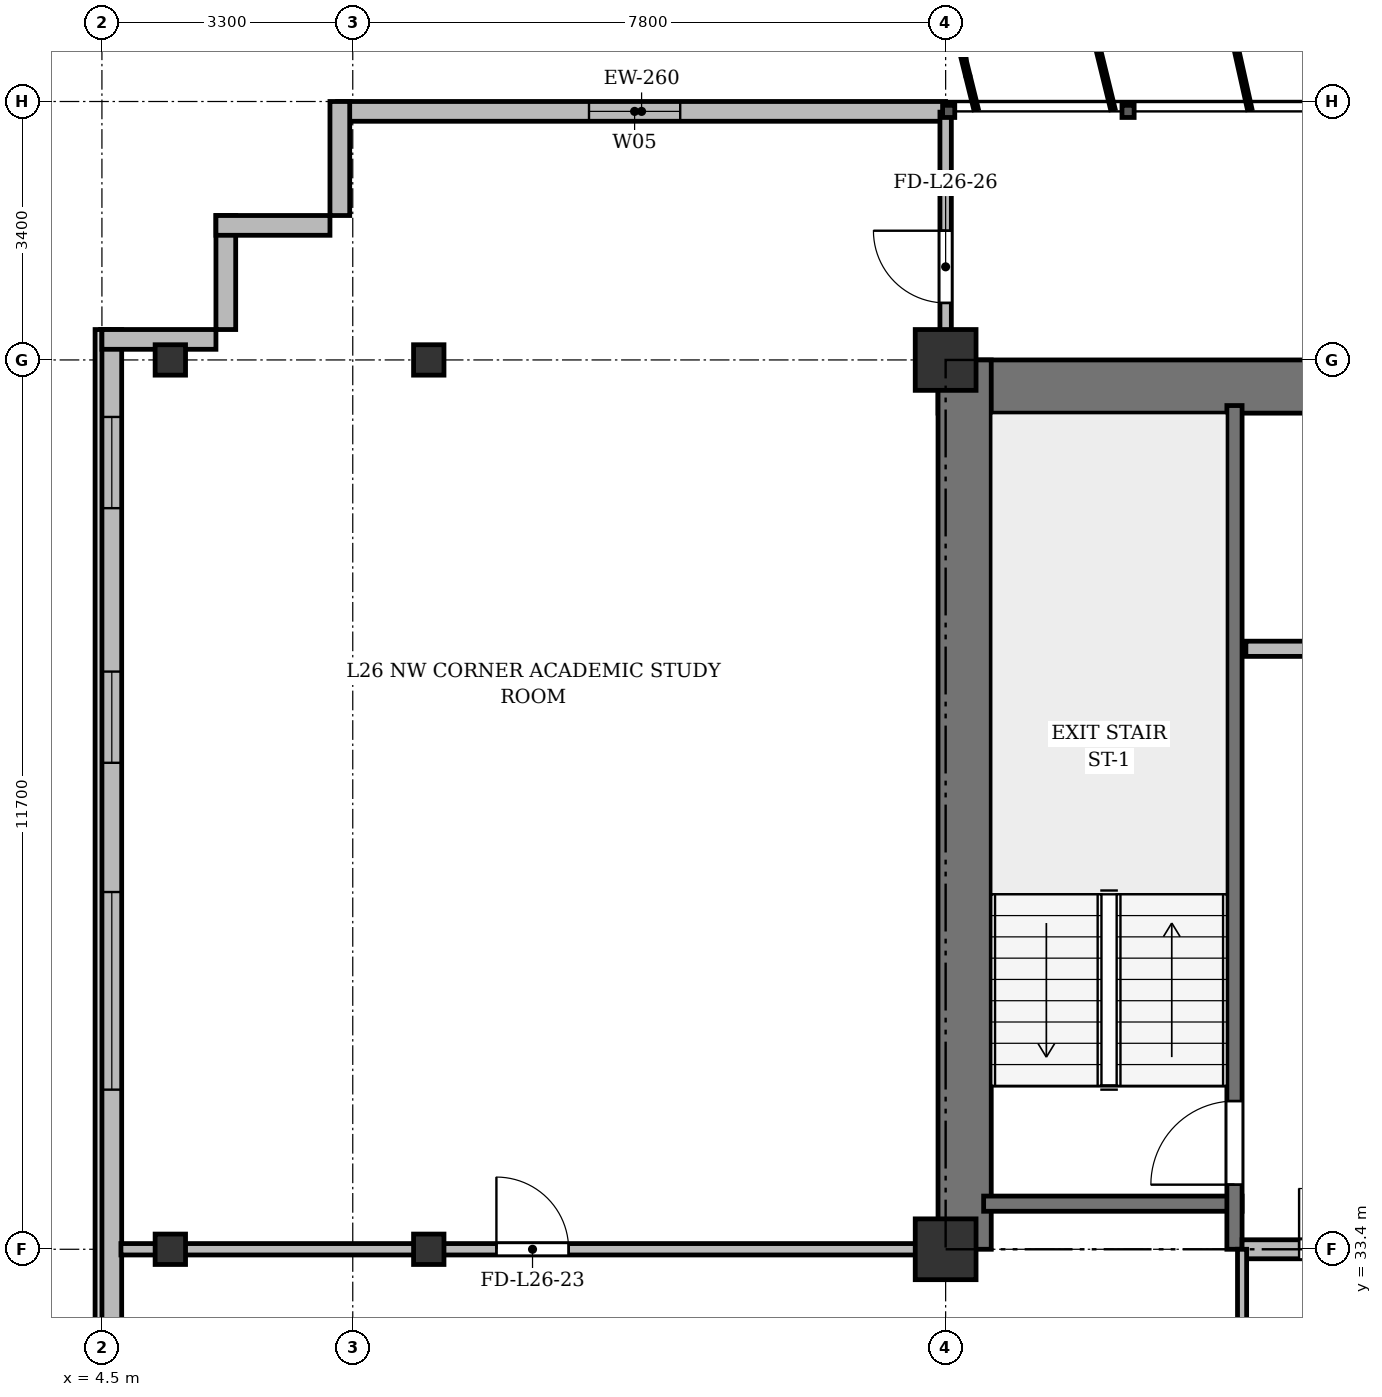
"""IFC4 building model, lengths in metres.
Left out: names, types, materials, properties, quantities, classifications, styles, units other than length and angle.
Written with IfcOpenShell. Run it as: python <this file> out.ifc"""

import sys

from ifc_helpers import new_model, si_unit, direction, frame, frame_2d, origin, origin_2d, place, context, subcontext, project, spatial, rectangle, i_section, extrude, source, transform, mapped, element, fill, save


model = new_model("IFC4")
c1 = context("Model", 3, precision=1e-05, world=origin(), true_north=direction((0.0, 1.0)))
c2 = subcontext(c1, "Body", "Model", "MODEL_VIEW")
j1 = project(units=[si_unit("LENGTHUNIT", "METRE"), si_unit("PLANEANGLEUNIT", "RADIAN")], contexts=[c1])
p1 = place(None, origin())
s1 = spatial("IfcSite", under=j1, at=p1, CompositionType="ELEMENT")
p2 = place(p1, origin())
s2 = spatial("IfcBuilding", under=s1, at=p2, CompositionType="ELEMENT")
p3 = place(p2, frame((0.0, 0.0, 103.3)))
s3 = spatial("IfcBuildingStorey", under=s2, at=p3, CompositionType="ELEMENT", Elevation=103.3)
m1 = source(origin(), c2, "Body", "SweptSolid", [
    extrude(i_section(OverallWidth=0.4, OverallDepth=0.4, WebThickness=0.022, FlangeThickness=0.035, at=origin_2d()), origin(), (0.0, 0.0, 1.0), 3.6),
])
for number, where, z_axis, x_axis in (
    (1, (5.4, 33.4, 0.0), (0.0, 0.0, 1.0), (1.0, 0.0, 0.0)),
    (2, (5.4, 45.1, 0.0), (0.0, 0.0, 1.0), (1.0, 0.0, 0.0)),
    (3, (8.8, 33.4, 0.0), (0.0, 0.0, 1.0), (1.0, 0.0, 0.0)),
    (4, (8.8, 45.1, 0.0), (0.0, 0.0, 1.0), (1.0, 0.0, 0.0)),
):
    element("IfcColumn", number, at=place(p3, frame(where, z_axis=z_axis, x_axis=x_axis)), inside=s3, PredefinedType="COLUMN", context=c2, shape_type="MappedRepresentation", body=[
        mapped(m1, transform((0.0, 0.0, 0.0), x_axis=(1.0, 0.0, 0.0), y_axis=(0.0, 1.0, 0.0), z_axis=(0.0, 0.0, 1.0), scale=1.0)),
    ])
m2 = source(origin(), c2, "Body", "SweptSolid", [
    extrude(rectangle(XDim=0.8, YDim=0.8, at=origin_2d()), origin(), (0.0, 0.0, 1.0), 3.6),
])
for number, where, z_axis, x_axis in (
    (5, (15.6, 33.4, 0.0), (0.0, 0.0, 1.0), (1.0, 0.0, 0.0)),
    (6, (15.6, 45.1, 0.0), (0.0, 0.0, 1.0), (1.0, 0.0, 0.0)),
):
    element("IfcColumn", number, at=place(p3, frame(where, z_axis=z_axis, x_axis=x_axis)), inside=s3, PredefinedType="COLUMN", context=c2, shape_type="MappedRepresentation", body=[
        mapped(m2, transform((0.0, 0.0, 0.0), x_axis=(1.0, 0.0, 0.0), y_axis=(0.0, 1.0, 0.0), z_axis=(0.0, 0.0, 1.0), scale=1.0)),
    ])
p4 = place(p3, frame((7.6, 48.37, 0.0), z_axis=(0.0, 0.0, 1.0), x_axis=(1.0, 0.0, 0.0)))
e7 = element("IfcWall", 7, at=p4, inside=s3, PredefinedType="SOLIDWALL", context=c2, shape_type="SweptSolid", body=[
    extrude(rectangle(XDim=8.0, YDim=0.26, at=frame_2d((4.0, 0.0))), origin(), (0.0, 0.0, 1.0), 3.34),
])
p5 = place(p4, frame((3.308, 0.0, 0.9)))
e8 = element("IfcOpeningElement", 8, at=p5, cuts=e7, PredefinedType="OPENING", context=c2, shape_type="SweptSolid", body=[
    extrude(rectangle(XDim=1.2, YDim=1.65, at=frame_2d((0.6, 0.825))), frame((0.0, 0.14, 0.0), z_axis=(0.0, -1.0, 0.0), x_axis=(1.0, 0.0, 0.0)), (0.0, 0.0, 1.0), 0.28),
])
p6 = place(p3, frame((4.63, 5.9, 0.0), z_axis=(0.0, 0.0, 1.0), x_axis=(0.0, 1.0, 0.0)))
e9 = element("IfcWall", 9, at=p6, inside=s3, PredefinedType="SOLIDWALL", context=c2, shape_type="SweptSolid", body=[
    extrude(rectangle(XDim=39.6, YDim=0.26, at=frame_2d((19.8, 0.0))), origin(), (0.0, 0.0, 1.0), 3.34),
])
p7 = place(p6, frame((1.45, 0.0, 0.92)))
e10 = element("IfcOpeningElement", 10, at=p7, cuts=e9, PredefinedType="OPENING", context=c2, shape_type="SweptSolid", body=[
    extrude(rectangle(XDim=1.2, YDim=1.65, at=frame_2d((0.6, 0.825))), frame((0.0, 0.14, 0.0), z_axis=(0.0, -1.0, 0.0), x_axis=(1.0, 0.0, 0.0)), (0.0, 0.0, 1.0), 0.28),
])
p8 = place(p6, frame((4.2, 0.0, 0.92)))
e11 = element("IfcOpeningElement", 11, at=p8, cuts=e9, PredefinedType="OPENING", context=c2, shape_type="SweptSolid", body=[
    extrude(rectangle(XDim=2.6, YDim=1.9, at=frame_2d((1.3, 0.95))), frame((0.0, 0.14, 0.0), z_axis=(0.0, -1.0, 0.0), x_axis=(1.0, 0.0, 0.0)), (0.0, 0.0, 1.0), 0.28),
])
p9 = place(p6, frame((8.4, 0.0, 0.92)))
e12 = element("IfcOpeningElement", 12, at=p9, cuts=e9, PredefinedType="OPENING", context=c2, shape_type="SweptSolid", body=[
    extrude(rectangle(XDim=2.6, YDim=1.9, at=frame_2d((1.3, 0.95))), frame((0.0, 0.14, 0.0), z_axis=(0.0, -1.0, 0.0), x_axis=(1.0, 0.0, 0.0)), (0.0, 0.0, 1.0), 0.28),
])
p10 = place(p6, frame((15.6, 0.0, 0.92)))
e13 = element("IfcOpeningElement", 13, at=p10, cuts=e9, PredefinedType="OPENING", context=c2, shape_type="SweptSolid", body=[
    extrude(rectangle(XDim=2.6, YDim=1.9, at=frame_2d((1.3, 0.95))), frame((0.0, 0.14, 0.0), z_axis=(0.0, -1.0, 0.0), x_axis=(1.0, 0.0, 0.0)), (0.0, 0.0, 1.0), 0.28),
])
p11 = place(p6, frame((29.6, 0.0, 0.92)))
e14 = element("IfcOpeningElement", 14, at=p11, cuts=e9, PredefinedType="OPENING", context=c2, shape_type="SweptSolid", body=[
    extrude(rectangle(XDim=2.6, YDim=1.9, at=frame_2d((1.3, 0.95))), frame((0.0, 0.14, 0.0), z_axis=(0.0, -1.0, 0.0), x_axis=(1.0, 0.0, 0.0)), (0.0, 0.0, 1.0), 0.28),
])
p12 = place(p6, frame((33.9, 0.0, 0.92)))
e15 = element("IfcOpeningElement", 15, at=p12, cuts=e9, PredefinedType="OPENING", context=c2, shape_type="SweptSolid", body=[
    extrude(rectangle(XDim=1.2, YDim=1.65, at=frame_2d((0.6, 0.825))), frame((0.0, 0.14, 0.0), z_axis=(0.0, -1.0, 0.0), x_axis=(1.0, 0.0, 0.0)), (0.0, 0.0, 1.0), 0.28),
])
p13 = place(p6, frame((37.25, 0.0, 0.92)))
e16 = element("IfcOpeningElement", 16, at=p13, cuts=e9, PredefinedType="OPENING", context=c2, shape_type="SweptSolid", body=[
    extrude(rectangle(XDim=1.2, YDim=1.65, at=frame_2d((0.6, 0.825))), frame((0.0, 0.14, 0.0), z_axis=(0.0, -1.0, 0.0), x_axis=(1.0, 0.0, 0.0)), (0.0, 0.0, 1.0), 0.28),
])
p14 = place(p3, frame((4.5, 45.37, 0.0), z_axis=(0.0, 0.0, 1.0), x_axis=(1.0, 0.0, 0.0)))
e17 = element("IfcWall", 17, at=p14, inside=s3, PredefinedType="SOLIDWALL", context=c2, shape_type="SweptSolid", body=[
    extrude(rectangle(XDim=1.5, YDim=0.26, at=frame_2d((0.75, 0.0))), origin(), (0.0, 0.0, 1.0), 2.752),
])
for number, where, z_axis, x_axis in (
    (18, (6.13, 45.5, 0.0), (0.0, 0.0, 1.0), (0.0, 1.0, 0.0)),
    (19, (6.0, 46.87, 0.0), (0.0, 0.0, 1.0), (1.0, 0.0, 0.0)),
    (20, (7.63, 47.0, 0.0), (0.0, 0.0, 1.0), (0.0, 1.0, 0.0)),
):
    element("IfcWall", number, at=place(p3, frame(where, z_axis=z_axis, x_axis=x_axis)), inside=s3, PredefinedType="SOLIDWALL", context=c2, shape_type="SweptSolid", body=[
        extrude(rectangle(XDim=1.5, YDim=0.26, at=frame_2d((0.75, 0.0))), origin(), (0.0, 0.0, 1.0), 3.34),
    ])
p15 = place(p3, frame((15.5, 44.75, 0.0), z_axis=(0.0, 0.0, 1.0), x_axis=(1.0, 0.0, 0.0)))
e21 = element("IfcWall", 21, at=p15, inside=s3, PredefinedType="SHEAR", context=c2, shape_type="SweptSolid", body=[
    extrude(rectangle(XDim=43.4, YDim=0.7, at=frame_2d((21.7, 0.0))), origin(), (0.0, 0.0, 1.0), 3.34),
])
p16 = place(p3, frame((15.85, 33.4, 0.0), z_axis=(0.0, 0.0, 1.0), x_axis=(0.0, 1.0, 0.0)))
e22 = element("IfcWall", 22, at=p16, inside=s3, PredefinedType="SHEAR", context=c2, shape_type="SweptSolid", body=[
    extrude(rectangle(XDim=11.7, YDim=0.7, at=frame_2d((5.85, 0.0))), origin(), (0.0, 0.0, 1.0), 3.34),
])
p17 = place(p3, frame((16.1, 34.0, 0.0), z_axis=(0.0, 0.0, 1.0), x_axis=(1.0, 0.0, 0.0)))
e23 = element("IfcWall", 23, at=p17, inside=s3, PredefinedType="SHEAR", context=c2, shape_type="SweptSolid", body=[
    extrude(rectangle(XDim=3.4, YDim=0.2, at=frame_2d((1.7, 0.0))), origin(), (0.0, 0.0, 1.0), 3.34),
])
p18 = place(p3, frame((19.4, 33.4, 0.0), z_axis=(0.0, 0.0, 1.0), x_axis=(0.0, 1.0, 0.0)))
e24 = element("IfcWall", 24, at=p18, inside=s3, PredefinedType="SHEAR", context=c2, shape_type="SweptSolid", body=[
    extrude(rectangle(XDim=11.1, YDim=0.2, at=frame_2d((5.55, 0.0))), origin(), (0.0, 0.0, 1.0), 3.34),
])
p19 = place(p18, frame((0.85, 0.0, 0.0)))
e25 = element("IfcOpeningElement", 25, at=p19, cuts=e24, PredefinedType="OPENING", context=c2, shape_type="SweptSolid", body=[
    extrude(rectangle(XDim=1.1, YDim=2.15, at=frame_2d((0.55, 1.075))), frame((0.0, 0.11, 0.0), z_axis=(0.0, -1.0, 0.0), x_axis=(1.0, 0.0, 0.0)), (0.0, 0.0, 1.0), 0.22),
])
p20 = place(p3, frame((19.55, 41.3, 0.0), z_axis=(0.0, 0.0, 1.0), x_axis=(1.0, 0.0, 0.0)))
e26 = element("IfcWall", 26, at=p20, inside=s3, PredefinedType="SOLIDWALL", context=c2, shape_type="SweptSolid", body=[
    extrude(rectangle(XDim=6.75, YDim=0.2, at=frame_2d((3.375, 0.0))), origin(), (0.0, 0.0, 1.0), 3.34),
])
p21 = place(p20, frame((1.7, 0.0, 0.0)))
e27 = element("IfcOpeningElement", 27, at=p21, cuts=e26, PredefinedType="OPENING", context=c2, shape_type="SweptSolid", body=[
    extrude(rectangle(XDim=1.1, YDim=2.15, at=frame_2d((0.55, 1.075))), frame((0.0, 0.11, 0.0), z_axis=(0.0, -1.0, 0.0), x_axis=(1.0, 0.0, 0.0)), (0.0, 0.0, 1.0), 0.22),
])
p22 = place(p20, frame((4.4, 0.0, 0.0)))
e28 = element("IfcOpeningElement", 28, at=p22, cuts=e26, PredefinedType="OPENING", context=c2, shape_type="SweptSolid", body=[
    extrude(rectangle(XDim=1.1, YDim=2.15, at=frame_2d((0.55, 1.075))), frame((0.0, 0.11, 0.0), z_axis=(0.0, -1.0, 0.0), x_axis=(1.0, 0.0, 0.0)), (0.0, 0.0, 1.0), 0.22),
])
p23 = place(p3, frame((19.5, 33.4, 0.0), z_axis=(0.0, 0.0, 1.0), x_axis=(1.0, 0.0, 0.0)))
e29 = element("IfcWall", 29, at=p23, inside=s3, PredefinedType="PARTITIONING", context=c2, shape_type="SweptSolid", body=[
    extrude(rectangle(XDim=6.8, YDim=0.25, at=frame_2d((3.4, 0.0))), origin(), (0.0, 0.0, 1.0), 2.752),
])
p24 = place(p23, frame((0.75, 0.0, 0.0)))
e30 = element("IfcOpeningElement", 30, at=p24, cuts=e29, PredefinedType="OPENING", context=c2, shape_type="SweptSolid", body=[
    extrude(rectangle(XDim=1.6, YDim=2.2, at=frame_2d((0.8, 1.1))), frame((0.0, 0.135, 0.0), z_axis=(0.0, -1.0, 0.0), x_axis=(1.0, 0.0, 0.0)), (0.0, 0.0, 1.0), 0.27),
])
p25 = place(p3, frame((19.5, 29.8, 0.0), z_axis=(0.0, 0.0, 1.0), x_axis=(0.0, 1.0, 0.0)))
e31 = element("IfcWall", 31, at=p25, inside=s3, PredefinedType="PARTITIONING", context=c2, shape_type="SweptSolid", body=[
    extrude(rectangle(XDim=3.6, YDim=0.12, at=frame_2d((1.8, 0.0))), origin(), (0.0, 0.0, 1.0), 2.752),
])
p26 = place(p3, frame((4.75, 33.4, 0.0), z_axis=(0.0, 0.0, 1.0), x_axis=(1.0, 0.0, 0.0)))
e32 = element("IfcWall", 32, at=p26, inside=s3, PredefinedType="PARTITIONING", context=c2, shape_type="SweptSolid", body=[
    extrude(rectangle(XDim=10.85, YDim=0.15, at=frame_2d((5.425, 0.0))), origin(), (0.0, 0.0, 1.0), 2.752),
])
p27 = place(p26, frame((4.94, 0.0, 0.0)))
e33 = element("IfcOpeningElement", 33, at=p27, cuts=e32, PredefinedType="OPENING", context=c2, shape_type="SweptSolid", body=[
    extrude(rectangle(XDim=0.95, YDim=2.15, at=frame_2d((0.475, 1.075))), frame((0.0, 0.085, 0.0), z_axis=(0.0, -1.0, 0.0), x_axis=(1.0, 0.0, 0.0)), (0.0, 0.0, 1.0), 0.17),
])
p28 = place(p3, frame((15.6, 44.75, 0.0), z_axis=(0.0, 0.0, 1.0), x_axis=(0.0, 1.0, 0.0)))
e34 = element("IfcWall", 34, at=p28, inside=s3, PredefinedType="PARTITIONING", context=c2, shape_type="SweptSolid", body=[
    extrude(rectangle(XDim=3.61, YDim=0.15, at=frame_2d((1.805, 0.0))), origin(), (0.0, 0.0, 1.0), 2.84),
])
p29 = place(p28, frame((1.1, 0.0, 0.0)))
e35 = element("IfcOpeningElement", 35, at=p29, cuts=e34, PredefinedType="OPENING", context=c2, shape_type="SweptSolid", body=[
    extrude(rectangle(XDim=0.95, YDim=2.15, at=frame_2d((0.475, 1.075))), frame((0.0, 0.085, 0.0), z_axis=(0.0, -1.0, 0.0), x_axis=(1.0, 0.0, 0.0)), (0.0, 0.0, 1.0), 0.17),
])
m3 = source(origin(), c2, "Body", "SweptSolid", [
    extrude(rectangle(XDim=1.2, YDim=1.65, at=frame_2d((0.6, 0.825))), frame((0.0, 0.03, 0.0), z_axis=(0.0, -1.0, 0.0), x_axis=(1.0, 0.0, 0.0)), (0.0, 0.0, 1.0), 0.06),
])
p30 = place(p5, origin())
e36 = element("IfcWindow", 36, at=p30, inside=s3, PartitioningType="SINGLE_PANEL", PredefinedType="WINDOW", context=c2, shape_type="MappedRepresentation", body=[
    mapped(m3, transform((0.0, 0.0, 0.0), x_axis=(1.0, 0.0, 0.0), y_axis=(0.0, 1.0, 0.0), z_axis=(0.0, 0.0, 1.0), scale=1.0)),
])
fill(e8, e36)
m4 = source(origin(), c2, "Body", "SweptSolid", [
    extrude(rectangle(XDim=2.6, YDim=1.9, at=frame_2d((1.3, 0.95))), frame((0.0, 0.03, 0.0), z_axis=(0.0, -1.0, 0.0), x_axis=(1.0, 0.0, 0.0)), (0.0, 0.0, 1.0), 0.06),
])
p31 = place(p11, origin())
e37 = element("IfcWindow", 37, at=p31, inside=s3, PartitioningType="SINGLE_PANEL", PredefinedType="WINDOW", context=c2, shape_type="MappedRepresentation", body=[
    mapped(m4, transform((0.0, 0.0, 0.0), x_axis=(1.0, 0.0, 0.0), y_axis=(0.0, 1.0, 0.0), z_axis=(0.0, 0.0, 1.0), scale=1.0)),
])
fill(e14, e37)
p32 = place(p12, origin())
e38 = element("IfcWindow", 38, at=p32, inside=s3, PartitioningType="SINGLE_PANEL", PredefinedType="WINDOW", context=c2, shape_type="MappedRepresentation", body=[
    mapped(m3, transform((0.0, 0.0, 0.0), x_axis=(1.0, 0.0, 0.0), y_axis=(0.0, 1.0, 0.0), z_axis=(0.0, 0.0, 1.0), scale=1.0)),
])
fill(e15, e38)
p33 = place(p13, origin())
e39 = element("IfcWindow", 39, at=p33, inside=s3, PartitioningType="SINGLE_PANEL", PredefinedType="WINDOW", context=c2, shape_type="MappedRepresentation", body=[
    mapped(m3, transform((0.0, 0.0, 0.0), x_axis=(1.0, 0.0, 0.0), y_axis=(0.0, 1.0, 0.0), z_axis=(0.0, 0.0, 1.0), scale=1.0)),
])
fill(e16, e39)
m5 = source(origin(), c2, "Body", "SweptSolid", [
    extrude(rectangle(XDim=1.1, YDim=2.15, at=frame_2d((0.55, 1.075))), frame((0.0, 0.025, 0.0), z_axis=(0.0, -1.0, 0.0), x_axis=(1.0, 0.0, 0.0)), (0.0, 0.0, 1.0), 0.05),
])
p34 = place(p19, origin())
e40 = element("IfcDoor", 40, at=p34, inside=s3, OperationType="SINGLE_SWING_LEFT", PredefinedType="DOOR", context=c2, shape_type="MappedRepresentation", body=[
    mapped(m5, transform((0.0, 0.0, 0.0), x_axis=(1.0, 0.0, 0.0), y_axis=(0.0, 1.0, 0.0), z_axis=(0.0, 0.0, 1.0), scale=1.0)),
])
fill(e25, e40)
m6 = source(origin(), c2, "Body", "SweptSolid", [
    extrude(rectangle(XDim=1.6, YDim=2.2, at=frame_2d((0.8, 1.1))), frame((0.0, 0.025, 0.0), z_axis=(0.0, -1.0, 0.0), x_axis=(1.0, 0.0, 0.0)), (0.0, 0.0, 1.0), 0.05),
])
p35 = place(p24, origin())
e41 = element("IfcDoor", 41, at=p35, inside=s3, OperationType="DOUBLE_DOOR_SINGLE_SWING", PredefinedType="DOOR", context=c2, shape_type="MappedRepresentation", body=[
    mapped(m6, transform((0.0, 0.0, 0.0), x_axis=(1.0, 0.0, 0.0), y_axis=(0.0, 1.0, 0.0), z_axis=(0.0, 0.0, 1.0), scale=1.0)),
])
fill(e30, e41)
m7 = source(origin(), c2, "Body", "SweptSolid", [
    extrude(rectangle(XDim=0.95, YDim=2.15, at=frame_2d((0.475, 1.075))), frame((0.0, 0.025, 0.0), z_axis=(0.0, -1.0, 0.0), x_axis=(1.0, 0.0, 0.0)), (0.0, 0.0, 1.0), 0.05),
])
p36 = place(p27, origin())
e42 = element("IfcDoor", 42, at=p36, inside=s3, OperationType="SINGLE_SWING_LEFT", PredefinedType="DOOR", context=c2, shape_type="MappedRepresentation", body=[
    mapped(m7, transform((0.0, 0.0, 0.0), x_axis=(1.0, 0.0, 0.0), y_axis=(0.0, 1.0, 0.0), z_axis=(0.0, 0.0, 1.0), scale=1.0)),
])
fill(e33, e42)
p37 = place(p29, origin())
e43 = element("IfcDoor", 43, at=p37, inside=s3, OperationType="SINGLE_SWING_RIGHT", PredefinedType="DOOR", context=c2, shape_type="MappedRepresentation", body=[
    mapped(m7, transform((0.0, 0.0, 0.0), x_axis=(1.0, 0.0, 0.0), y_axis=(0.0, 1.0, 0.0), z_axis=(0.0, 0.0, 1.0), scale=1.0)),
])
fill(e35, e43)
save(model, sys.argv[1])
